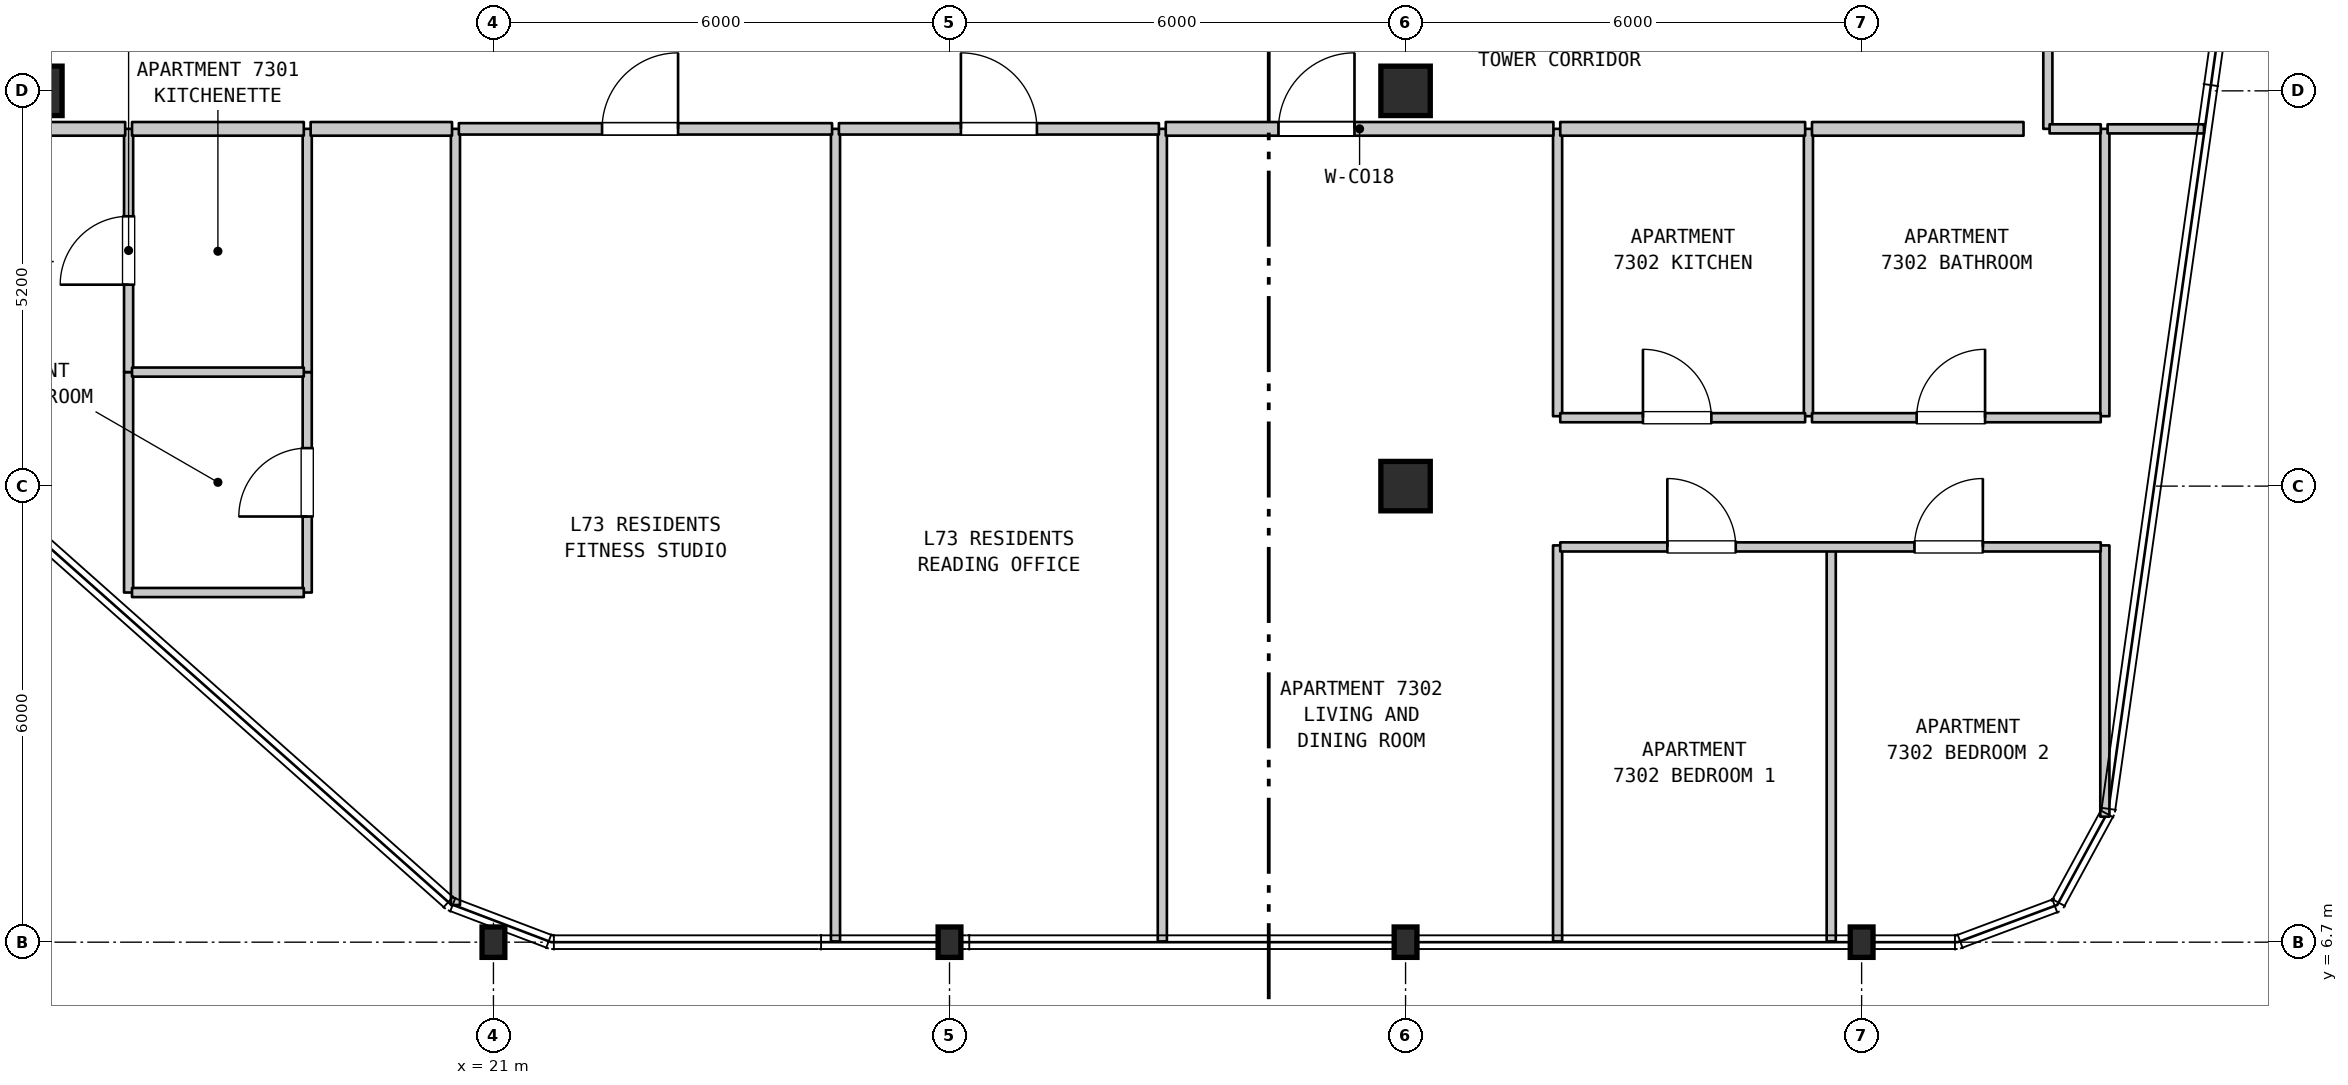
"""IFC4 building model, lengths in metres.
Left out: names, types, materials, properties, quantities, classifications, styles, units other than length and angle.
Written with IfcOpenShell. Run it as: python <this file> out.ifc"""

import sys

from ifc_helpers import new_model, si_unit, direction, frame, frame_2d, origin, origin_2d, place, context, subcontext, project, spatial, rectangle, i_section, extrude, element, fill, save


model = new_model("IFC4")
c1 = context("Model", 3, precision=1e-05, world=origin(), true_north=direction((0.0, 1.0)))
c2 = subcontext(c1, "Body", "Model", "MODEL_VIEW")
j1 = project(units=[si_unit("LENGTHUNIT", "METRE"), si_unit("PLANEANGLEUNIT", "RADIAN")], contexts=[c1])
p1 = place(None, origin())
s1 = spatial("IfcSite", under=j1, at=p1, CompositionType="ELEMENT")
p2 = place(p1, origin())
s2 = spatial("IfcBuilding", under=s1, at=p2, CompositionType="ELEMENT")
p3 = place(p2, frame((0.0, 0.0, 291.7)))
s3 = spatial("IfcBuildingStorey", under=s2, at=p3, CompositionType="ELEMENT", Elevation=291.7)
p4 = place(p3, frame((15.0, 17.9, 0.0), z_axis=(0.0, 0.0, 1.0), x_axis=(1.0, 0.0, 0.0)))
e1 = element("IfcColumn", 1, at=p4, inside=s3, PredefinedType="COLUMN", context=c2, shape_type="SweptSolid", body=[
    extrude(rectangle(XDim=0.65, YDim=0.65, at=origin_2d()), origin(), (0.0, 0.0, 1.0), 3.7),
])
for number, where, z_axis, x_axis in (
    (2, (21.0, 6.7, 0.0), (0.0, 0.0, 1.0), (1.0, 0.0, 0.0)),
    (3, (27.0, 6.7, 0.0), (0.0, 0.0, 1.0), (1.0, 0.0, 0.0)),
    (4, (33.0, 6.7, 0.0), (0.0, 0.0, 1.0), (1.0, 0.0, 0.0)),
):
    element("IfcColumn", number, at=place(p3, frame(where, z_axis=z_axis, x_axis=x_axis)), inside=s3, PredefinedType="COLUMN", context=c2, shape_type="SweptSolid", body=[
        extrude(i_section(OverallWidth=0.3, OverallDepth=0.4, WebThickness=0.013, FlangeThickness=0.024, FilletRadius=0.027, at=origin_2d()), origin(), (0.0, 0.0, 1.0), 3.7),
    ])
for number, where, z_axis, x_axis in (
    (5, (33.0, 12.7, 0.0), (0.0, 0.0, 1.0), (1.0, 0.0, 0.0)),
    (6, (33.0, 17.9, 0.0), (0.0, 0.0, 1.0), (1.0, 0.0, 0.0)),
):
    element("IfcColumn", number, at=place(p3, frame(where, z_axis=z_axis, x_axis=x_axis)), inside=s3, PredefinedType="COLUMN", context=c2, shape_type="SweptSolid", body=[
        extrude(rectangle(XDim=0.65, YDim=0.65, at=origin_2d()), origin(), (0.0, 0.0, 1.0), 3.7),
    ])
p5 = place(p3, frame((39.0, 6.7, 0.0), z_axis=(0.0, 0.0, 1.0), x_axis=(1.0, 0.0, 0.0)))
e7 = element("IfcColumn", 7, at=p5, inside=s3, PredefinedType="COLUMN", context=c2, shape_type="SweptSolid", body=[
    extrude(i_section(OverallWidth=0.3, OverallDepth=0.4, WebThickness=0.013, FlangeThickness=0.024, FilletRadius=0.027, at=origin_2d()), origin(), (0.0, 0.0, 1.0), 3.7),
])
p6 = place(p3, frame((16.2, 11.3, 0.0), z_axis=(0.0, 0.0, 1.0), x_axis=(0.0, 1.0, 0.0)))
e8 = element("IfcWall", 8, at=p6, inside=s3, PredefinedType="PARTITIONING", context=c2, shape_type="SweptSolid", body=[
    extrude(rectangle(XDim=2.9, YDim=0.12, at=frame_2d((1.45, 0.0))), origin(), (0.0, 0.0, 1.0), 3.39),
])
p7 = place(p3, frame((16.2, 14.2, 0.0), z_axis=(0.0, 0.0, 1.0), x_axis=(0.0, 1.0, 0.0)))
e9 = element("IfcWall", 9, at=p7, inside=s3, PredefinedType="PARTITIONING", context=c2, shape_type="SweptSolid", body=[
    extrude(rectangle(XDim=3.2, YDim=0.12, at=frame_2d((1.6, 0.0))), origin(), (0.0, 0.0, 1.0), 3.39),
])
p8 = place(p7, frame((1.15, 0.0, 0.0)))
e10 = element("IfcOpeningElement", 10, at=p8, cuts=e9, PredefinedType="OPENING", context=c2, shape_type="SweptSolid", body=[
    extrude(rectangle(XDim=0.9, YDim=2.15, at=frame_2d((0.45, 1.075))), frame((0.0, 0.07, 0.0), z_axis=(0.0, -1.0, 0.0), x_axis=(1.0, 0.0, 0.0)), (0.0, 0.0, 1.0), 0.14),
])
p9 = place(p3, frame((18.55, 11.3, 0.0), z_axis=(0.0, 0.0, 1.0), x_axis=(0.0, 1.0, 0.0)))
e11 = element("IfcWall", 11, at=p9, inside=s3, PredefinedType="PARTITIONING", context=c2, shape_type="SweptSolid", body=[
    extrude(rectangle(XDim=2.9, YDim=0.12, at=frame_2d((1.45, 0.0))), origin(), (0.0, 0.0, 1.0), 3.39),
])
p10 = place(p9, frame((1.0, 0.0, 0.0)))
e12 = element("IfcOpeningElement", 12, at=p10, cuts=e11, PredefinedType="OPENING", context=c2, shape_type="SweptSolid", body=[
    extrude(rectangle(XDim=0.9, YDim=2.1, at=frame_2d((0.45, 1.05))), frame((0.0, 0.07, 0.0), z_axis=(0.0, -1.0, 0.0), x_axis=(1.0, 0.0, 0.0)), (0.0, 0.0, 1.0), 0.14),
])
p11 = place(p3, frame((18.55, 14.2, 0.0), z_axis=(0.0, 0.0, 1.0), x_axis=(0.0, 1.0, 0.0)))
e13 = element("IfcWall", 13, at=p11, inside=s3, PredefinedType="PARTITIONING", context=c2, shape_type="SweptSolid", body=[
    extrude(rectangle(XDim=3.2, YDim=0.12, at=frame_2d((1.6, 0.0))), origin(), (0.0, 0.0, 1.0), 3.39),
])
p12 = place(p3, frame((20.5, 7.189, 0.0), z_axis=(0.0, 0.0, 1.0), x_axis=(0.0, 1.0, 0.0)))
e14 = element("IfcWall", 14, at=p12, inside=s3, PredefinedType="PARTITIONING", context=c2, shape_type="SweptSolid", body=[
    extrude(rectangle(XDim=10.211, YDim=0.12, at=frame_2d((5.105, 0.0))), origin(), (0.0, 0.0, 1.0), 3.39),
])
for number, where, z_axis, x_axis in (
    (15, (25.5, 6.71, 0.0), (0.0, 0.0, 1.0), (0.0, 1.0, 0.0)),
    (16, (29.8, 6.71, 0.0), (0.0, 0.0, 1.0), (0.0, 1.0, 0.0)),
):
    element("IfcWall", number, at=place(p3, frame(where, z_axis=z_axis, x_axis=x_axis)), inside=s3, PredefinedType="PARTITIONING", context=c2, shape_type="SweptSolid", body=[
        extrude(rectangle(XDim=10.69, YDim=0.12, at=frame_2d((5.345, 0.0))), origin(), (0.0, 0.0, 1.0), 3.39),
    ])
p13 = place(p3, frame((35.0, 6.71, 0.0), z_axis=(0.0, 0.0, 1.0), x_axis=(0.0, 1.0, 0.0)))
e17 = element("IfcWall", 17, at=p13, inside=s3, PredefinedType="PARTITIONING", context=c2, shape_type="SweptSolid", body=[
    extrude(rectangle(XDim=5.21, YDim=0.12, at=frame_2d((2.605, 0.0))), origin(), (0.0, 0.0, 1.0), 3.39),
])
for number, where, z_axis, x_axis in (
    (18, (35.0, 13.62, 0.0), (0.0, 0.0, 1.0), (0.0, 1.0, 0.0)),
    (19, (38.3, 13.62, 0.0), (0.0, 0.0, 1.0), (0.0, 1.0, 0.0)),
):
    element("IfcWall", number, at=place(p3, frame(where, z_axis=z_axis, x_axis=x_axis)), inside=s3, PredefinedType="PARTITIONING", context=c2, shape_type="SweptSolid", body=[
        extrude(rectangle(XDim=3.78, YDim=0.12, at=frame_2d((1.89, 0.0))), origin(), (0.0, 0.0, 1.0), 3.39),
    ])
p14 = place(p3, frame((38.6, 6.71, 0.0), z_axis=(0.0, 0.0, 1.0), x_axis=(0.0, 1.0, 0.0)))
e20 = element("IfcWall", 20, at=p14, inside=s3, PredefinedType="PARTITIONING", context=c2, shape_type="SweptSolid", body=[
    extrude(rectangle(XDim=5.21, YDim=0.12, at=frame_2d((2.605, 0.0))), origin(), (0.0, 0.0, 1.0), 3.39),
])
p15 = place(p3, frame((41.45, 17.4, 0.0), z_axis=(0.0, 0.0, 1.0), x_axis=(0.0, 1.0, 0.0)))
e21 = element("IfcWall", 21, at=p15, inside=s3, PredefinedType="PARTITIONING", context=c2, shape_type="SweptSolid", body=[
    extrude(rectangle(XDim=2.099, YDim=0.12, at=frame_2d((1.05, 0.0))), origin(), (0.0, 0.0, 1.0), 3.39),
])
p16 = place(p3, frame((42.2, 8.351, 0.0), z_axis=(0.0, 0.0, 1.0), x_axis=(0.0, 1.0, 0.0)))
e22 = element("IfcWall", 22, at=p16, inside=s3, PredefinedType="PARTITIONING", context=c2, shape_type="SweptSolid", body=[
    extrude(rectangle(XDim=3.569, YDim=0.12, at=frame_2d((1.784, 0.0))), origin(), (0.0, 0.0, 1.0), 3.39),
])
p17 = place(p3, frame((42.2, 13.62, 0.0), z_axis=(0.0, 0.0, 1.0), x_axis=(0.0, 1.0, 0.0)))
e23 = element("IfcWall", 23, at=p17, inside=s3, PredefinedType="PARTITIONING", context=c2, shape_type="SweptSolid", body=[
    extrude(rectangle(XDim=3.78, YDim=0.12, at=frame_2d((1.89, 0.0))), origin(), (0.0, 0.0, 1.0), 3.39),
])
p18 = place(p3, frame((16.245, 11.3, 0.0), z_axis=(0.0, 0.0, 1.0), x_axis=(1.0, 0.0, 0.0)))
e24 = element("IfcWall", 24, at=p18, inside=s3, PredefinedType="PARTITIONING", context=c2, shape_type="SweptSolid", body=[
    extrude(rectangle(XDim=2.26, YDim=0.12, at=frame_2d((1.13, 0.0))), origin(), (0.0, 0.0, 1.0), 3.39),
])
p19 = place(p3, frame((35.035, 11.9, 0.0), z_axis=(0.0, 0.0, 1.0), x_axis=(1.0, 0.0, 0.0)))
e25 = element("IfcWall", 25, at=p19, inside=s3, PredefinedType="PARTITIONING", context=c2, shape_type="SweptSolid", body=[
    extrude(rectangle(XDim=7.111, YDim=0.12, at=frame_2d((3.556, 0.0))), origin(), (0.0, 0.0, 1.0), 3.39),
])
p20 = place(p19, frame((1.409, 0.0, 0.0)))
e26 = element("IfcOpeningElement", 26, at=p20, cuts=e25, PredefinedType="OPENING", context=c2, shape_type="SweptSolid", body=[
    extrude(rectangle(XDim=0.9, YDim=2.15, at=frame_2d((0.45, 1.075))), frame((0.0, 0.07, 0.0), z_axis=(0.0, -1.0, 0.0), x_axis=(1.0, 0.0, 0.0)), (0.0, 0.0, 1.0), 0.14),
])
p21 = place(p19, frame((4.66, 0.0, 0.0)))
e27 = element("IfcOpeningElement", 27, at=p21, cuts=e25, PredefinedType="OPENING", context=c2, shape_type="SweptSolid", body=[
    extrude(rectangle(XDim=0.9, YDim=2.15, at=frame_2d((0.45, 1.075))), frame((0.0, 0.07, 0.0), z_axis=(0.0, -1.0, 0.0), x_axis=(1.0, 0.0, 0.0)), (0.0, 0.0, 1.0), 0.14),
])
p22 = place(p3, frame((35.035, 13.6, 0.0), z_axis=(0.0, 0.0, 1.0), x_axis=(1.0, 0.0, 0.0)))
e28 = element("IfcWall", 28, at=p22, inside=s3, PredefinedType="PARTITIONING", context=c2, shape_type="SweptSolid", body=[
    extrude(rectangle(XDim=3.222, YDim=0.12, at=frame_2d((1.611, 0.0))), origin(), (0.0, 0.0, 1.0), 3.39),
])
p23 = place(p22, frame((1.088, 0.0, 0.0)))
e29 = element("IfcOpeningElement", 29, at=p23, cuts=e28, PredefinedType="OPENING", context=c2, shape_type="SweptSolid", body=[
    extrude(rectangle(XDim=0.9, YDim=2.15, at=frame_2d((0.45, 1.075))), frame((0.0, 0.07, 0.0), z_axis=(0.0, -1.0, 0.0), x_axis=(1.0, 0.0, 0.0)), (0.0, 0.0, 1.0), 0.14),
])
p24 = place(p3, frame((38.347, 13.6, 0.0), z_axis=(0.0, 0.0, 1.0), x_axis=(1.0, 0.0, 0.0)))
e30 = element("IfcWall", 30, at=p24, inside=s3, PredefinedType="PARTITIONING", context=c2, shape_type="SweptSolid", body=[
    extrude(rectangle(XDim=3.799, YDim=0.12, at=frame_2d((1.899, 0.0))), origin(), (0.0, 0.0, 1.0), 3.39),
])
p25 = place(p24, frame((1.377, 0.0, 0.0)))
e31 = element("IfcOpeningElement", 31, at=p25, cuts=e30, PredefinedType="OPENING", context=c2, shape_type="SweptSolid", body=[
    extrude(rectangle(XDim=0.9, YDim=2.1, at=frame_2d((0.45, 1.05))), frame((0.0, 0.07, 0.0), z_axis=(0.0, -1.0, 0.0), x_axis=(1.0, 0.0, 0.0)), (0.0, 0.0, 1.0), 0.14),
])
p26 = place(p3, frame((16.245, 14.2, 0.0), z_axis=(0.0, 0.0, 1.0), x_axis=(1.0, 0.0, 0.0)))
e32 = element("IfcWall", 32, at=p26, inside=s3, PredefinedType="PARTITIONING", context=c2, shape_type="SweptSolid", body=[
    extrude(rectangle(XDim=2.26, YDim=0.12, at=frame_2d((1.13, 0.0))), origin(), (0.0, 0.0, 1.0), 3.39),
])
p27 = place(p3, frame((12.975, 17.4, 0.0), z_axis=(0.0, 0.0, 1.0), x_axis=(1.0, 0.0, 0.0)))
e33 = element("IfcWall", 33, at=p27, inside=s3, PredefinedType="STANDARD", context=c2, shape_type="SweptSolid", body=[
    extrude(rectangle(XDim=3.18, YDim=0.18, at=frame_2d((1.59, 0.0))), origin(), (0.0, 0.0, 1.0), 3.39),
])
p28 = place(p27, frame((0.332, 0.0, 0.0)))
e34 = element("IfcOpeningElement", 34, at=p28, cuts=e33, PredefinedType="OPENING", context=c2, shape_type="SweptSolid", body=[
    extrude(rectangle(XDim=1.0, YDim=2.15, at=frame_2d((0.5, 1.075))), frame((0.0, 0.1, 0.0), z_axis=(0.0, -1.0, 0.0), x_axis=(1.0, 0.0, 0.0)), (0.0, 0.0, 1.0), 0.2),
])
p29 = place(p3, frame((16.245, 17.4, 0.0), z_axis=(0.0, 0.0, 1.0), x_axis=(1.0, 0.0, 0.0)))
e35 = element("IfcWall", 35, at=p29, inside=s3, PredefinedType="STANDARD", context=c2, shape_type="SweptSolid", body=[
    extrude(rectangle(XDim=2.26, YDim=0.18, at=frame_2d((1.13, 0.0))), origin(), (0.0, 0.0, 1.0), 3.39),
])
p30 = place(p3, frame((18.595, 17.4, 0.0), z_axis=(0.0, 0.0, 1.0), x_axis=(1.0, 0.0, 0.0)))
e36 = element("IfcWall", 36, at=p30, inside=s3, PredefinedType="STANDARD", context=c2, shape_type="SweptSolid", body=[
    extrude(rectangle(XDim=1.86, YDim=0.18, at=frame_2d((0.93, 0.0))), origin(), (0.0, 0.0, 1.0), 3.39),
])
p31 = place(p3, frame((20.545, 17.4, 0.0), z_axis=(0.0, 0.0, 1.0), x_axis=(1.0, 0.0, 0.0)))
e37 = element("IfcWall", 37, at=p31, inside=s3, PredefinedType="STANDARD", context=c2, shape_type="SweptSolid", body=[
    extrude(rectangle(XDim=4.91, YDim=0.15, at=frame_2d((2.455, 0.0))), origin(), (0.0, 0.0, 1.0), 3.39),
])
p32 = place(p31, frame((1.884, 0.0, 0.0)))
e38 = element("IfcOpeningElement", 38, at=p32, cuts=e37, PredefinedType="OPENING", context=c2, shape_type="SweptSolid", body=[
    extrude(rectangle(XDim=1.0, YDim=2.15, at=frame_2d((0.5, 1.075))), frame((0.0, 0.085, 0.0), z_axis=(0.0, -1.0, 0.0), x_axis=(1.0, 0.0, 0.0)), (0.0, 0.0, 1.0), 0.17),
])
p33 = place(p3, frame((25.545, 17.4, 0.0), z_axis=(0.0, 0.0, 1.0), x_axis=(1.0, 0.0, 0.0)))
e39 = element("IfcWall", 39, at=p33, inside=s3, PredefinedType="STANDARD", context=c2, shape_type="SweptSolid", body=[
    extrude(rectangle(XDim=4.21, YDim=0.15, at=frame_2d((2.105, 0.0))), origin(), (0.0, 0.0, 1.0), 3.39),
])
p34 = place(p33, frame((1.605, 0.0, 0.0)))
e40 = element("IfcOpeningElement", 40, at=p34, cuts=e39, PredefinedType="OPENING", context=c2, shape_type="SweptSolid", body=[
    extrude(rectangle(XDim=1.0, YDim=2.15, at=frame_2d((0.5, 1.075))), frame((0.0, 0.085, 0.0), z_axis=(0.0, -1.0, 0.0), x_axis=(1.0, 0.0, 0.0)), (0.0, 0.0, 1.0), 0.17),
])
p35 = place(p3, frame((29.845, 17.4, 0.0), z_axis=(0.0, 0.0, 1.0), x_axis=(1.0, 0.0, 0.0)))
e41 = element("IfcWall", 41, at=p35, inside=s3, PredefinedType="STANDARD", context=c2, shape_type="SweptSolid", body=[
    extrude(rectangle(XDim=5.1, YDim=0.18, at=frame_2d((2.55, 0.0))), origin(), (0.0, 0.0, 1.0), 3.39),
])
p36 = place(p35, frame((1.483, 0.0, 0.0)))
e42 = element("IfcOpeningElement", 42, at=p36, cuts=e41, PredefinedType="OPENING", context=c2, shape_type="SweptSolid", body=[
    extrude(rectangle(XDim=1.0, YDim=2.15, at=frame_2d((0.5, 1.075))), frame((0.0, 0.1, 0.0), z_axis=(0.0, -1.0, 0.0), x_axis=(1.0, 0.0, 0.0)), (0.0, 0.0, 1.0), 0.2),
])
p37 = place(p3, frame((35.035, 17.4, 0.0), z_axis=(0.0, 0.0, 1.0), x_axis=(1.0, 0.0, 0.0)))
e43 = element("IfcWall", 43, at=p37, inside=s3, PredefinedType="STANDARD", context=c2, shape_type="SweptSolid", body=[
    extrude(rectangle(XDim=3.222, YDim=0.18, at=frame_2d((1.611, 0.0))), origin(), (0.0, 0.0, 1.0), 3.39),
])
p38 = place(p3, frame((38.347, 17.4, 0.0), z_axis=(0.0, 0.0, 1.0), x_axis=(1.0, 0.0, 0.0)))
e44 = element("IfcWall", 44, at=p38, inside=s3, PredefinedType="STANDARD", context=c2, shape_type="SweptSolid", body=[
    extrude(rectangle(XDim=2.783, YDim=0.18, at=frame_2d((1.392, 0.0))), origin(), (0.0, 0.0, 1.0), 3.39),
])
p39 = place(p3, frame((41.473, 17.4, 0.0), z_axis=(0.0, 0.0, 1.0), x_axis=(1.0, 0.0, 0.0)))
e45 = element("IfcWall", 45, at=p39, inside=s3, PredefinedType="PARTITIONING", context=c2, shape_type="SweptSolid", body=[
    extrude(rectangle(XDim=0.673, YDim=0.12, at=frame_2d((0.336, 0.0))), origin(), (0.0, 0.0, 1.0), 3.39),
])
p40 = place(p3, frame((42.236, 17.4, 0.0), z_axis=(0.0, 0.0, 1.0), x_axis=(1.0, 0.0, 0.0)))
e46 = element("IfcWall", 46, at=p40, inside=s3, PredefinedType="PARTITIONING", context=c2, shape_type="SweptSolid", body=[
    extrude(rectangle(XDim=1.268, YDim=0.12, at=frame_2d((0.634, 0.0))), origin(), (0.0, 0.0, 1.0), 3.39),
])
p41 = place(p8, origin())
e47 = element("IfcDoor", 47, at=p41, inside=s3, OperationType="SINGLE_SWING_LEFT", PredefinedType="DOOR", context=c2, shape_type="SweptSolid", body=[
    extrude(rectangle(XDim=0.9, YDim=2.15, at=frame_2d((0.45, 1.075))), frame((0.0, 0.025, 0.0), z_axis=(0.0, -1.0, 0.0), x_axis=(1.0, 0.0, 0.0)), (0.0, 0.0, 1.0), 0.05),
])
fill(e10, e47)
p42 = place(p10, origin())
e48 = element("IfcDoor", 48, at=p42, inside=s3, OperationType="SINGLE_SWING_LEFT", PredefinedType="DOOR", context=c2, shape_type="SweptSolid", body=[
    extrude(rectangle(XDim=0.9, YDim=2.1, at=frame_2d((0.45, 1.05))), frame((0.0, 0.025, 0.0), z_axis=(0.0, -1.0, 0.0), x_axis=(1.0, 0.0, 0.0)), (0.0, 0.0, 1.0), 0.05),
])
fill(e12, e48)
p43 = place(p20, origin())
e49 = element("IfcDoor", 49, at=p43, inside=s3, OperationType="SINGLE_SWING_LEFT", PredefinedType="DOOR", context=c2, shape_type="SweptSolid", body=[
    extrude(rectangle(XDim=0.9, YDim=2.15, at=frame_2d((0.45, 1.075))), frame((0.0, 0.025, 0.0), z_axis=(0.0, -1.0, 0.0), x_axis=(1.0, 0.0, 0.0)), (0.0, 0.0, 1.0), 0.05),
])
fill(e26, e49)
p44 = place(p21, origin())
e50 = element("IfcDoor", 50, at=p44, inside=s3, OperationType="SINGLE_SWING_RIGHT", PredefinedType="DOOR", context=c2, shape_type="SweptSolid", body=[
    extrude(rectangle(XDim=0.9, YDim=2.15, at=frame_2d((0.45, 1.075))), frame((0.0, 0.025, 0.0), z_axis=(0.0, -1.0, 0.0), x_axis=(1.0, 0.0, 0.0)), (0.0, 0.0, 1.0), 0.05),
])
fill(e27, e50)
p45 = place(p23, origin())
e51 = element("IfcDoor", 51, at=p45, inside=s3, OperationType="SINGLE_SWING_LEFT", PredefinedType="DOOR", context=c2, shape_type="SweptSolid", body=[
    extrude(rectangle(XDim=0.9, YDim=2.15, at=frame_2d((0.45, 1.075))), frame((0.0, 0.025, 0.0), z_axis=(0.0, -1.0, 0.0), x_axis=(1.0, 0.0, 0.0)), (0.0, 0.0, 1.0), 0.05),
])
fill(e29, e51)
p46 = place(p25, origin())
e52 = element("IfcDoor", 52, at=p46, inside=s3, OperationType="SINGLE_SWING_RIGHT", PredefinedType="DOOR", context=c2, shape_type="SweptSolid", body=[
    extrude(rectangle(XDim=0.9, YDim=2.1, at=frame_2d((0.45, 1.05))), frame((0.0, 0.025, 0.0), z_axis=(0.0, -1.0, 0.0), x_axis=(1.0, 0.0, 0.0)), (0.0, 0.0, 1.0), 0.05),
])
fill(e31, e52)
p47 = place(p32, origin())
e53 = element("IfcDoor", 53, at=p47, inside=s3, OperationType="SINGLE_SWING_RIGHT", PredefinedType="DOOR", context=c2, shape_type="SweptSolid", body=[
    extrude(rectangle(XDim=1.0, YDim=2.15, at=frame_2d((0.5, 1.075))), frame((0.0, 0.025, 0.0), z_axis=(0.0, -1.0, 0.0), x_axis=(1.0, 0.0, 0.0)), (0.0, 0.0, 1.0), 0.05),
])
fill(e38, e53)
p48 = place(p34, origin())
e54 = element("IfcDoor", 54, at=p48, inside=s3, OperationType="SINGLE_SWING_LEFT", PredefinedType="DOOR", context=c2, shape_type="SweptSolid", body=[
    extrude(rectangle(XDim=1.0, YDim=2.15, at=frame_2d((0.5, 1.075))), frame((0.0, 0.025, 0.0), z_axis=(0.0, -1.0, 0.0), x_axis=(1.0, 0.0, 0.0)), (0.0, 0.0, 1.0), 0.05),
])
fill(e40, e54)
p49 = place(p36, origin())
e55 = element("IfcDoor", 55, at=p49, inside=s3, OperationType="SINGLE_SWING_RIGHT", PredefinedType="DOOR", context=c2, shape_type="SweptSolid", body=[
    extrude(rectangle(XDim=1.0, YDim=2.15, at=frame_2d((0.5, 1.075))), frame((0.0, 0.025, 0.0), z_axis=(0.0, -1.0, 0.0), x_axis=(1.0, 0.0, 0.0)), (0.0, 0.0, 1.0), 0.05),
])
fill(e42, e55)
save(model, sys.argv[1])
